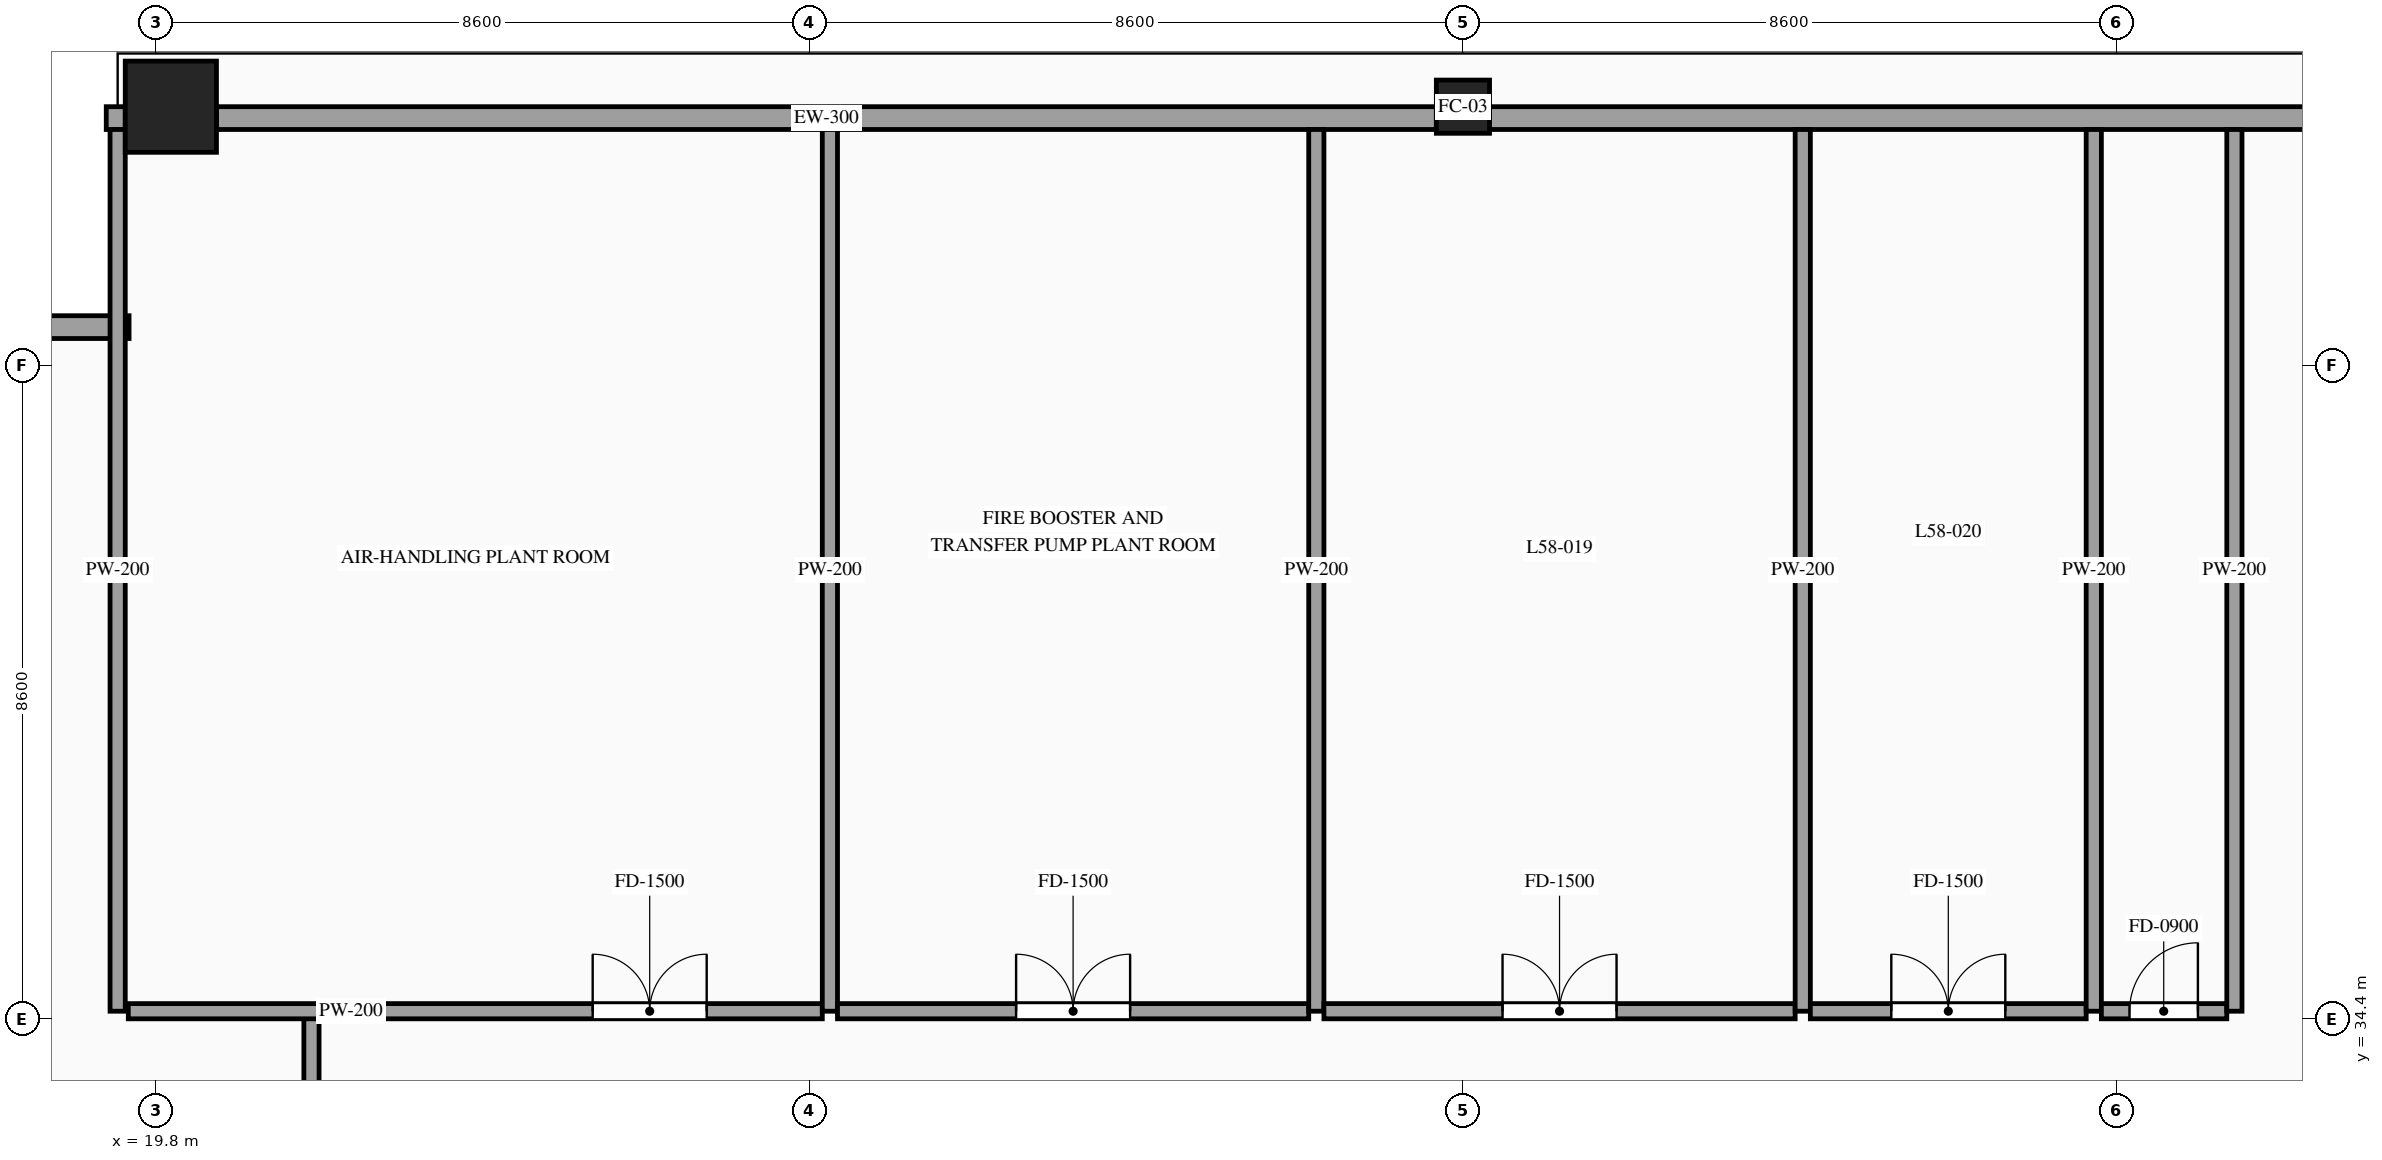
"""IFC4 building model, lengths in metres.
Left out: names, types, materials, properties, quantities, classifications, styles, units other than length and angle.
Written with IfcOpenShell. Run it as: python <this file> out.ifc"""

import sys

from ifc_helpers import new_model, si_unit, direction, frame, frame_2d, origin, origin_2d, place, context, subcontext, project, spatial, rectangle, hollow_rectangle, extrude, source, transform, mapped, element, fill, save


model = new_model("IFC4")
c1 = context("Model", 3, precision=1e-05, world=origin(), true_north=direction((0.0, 1.0)))
c2 = subcontext(c1, "Body", "Model", "MODEL_VIEW")
j1 = project(units=[si_unit("LENGTHUNIT", "METRE"), si_unit("PLANEANGLEUNIT", "RADIAN")], contexts=[c1])
p1 = place(None, origin())
s1 = spatial("IfcSite", under=j1, at=p1, CompositionType="ELEMENT")
p2 = place(p1, origin())
s2 = spatial("IfcBuilding", under=s1, at=p2, CompositionType="ELEMENT")
p3 = place(p2, frame((0.0, 0.0, 219.5)))
s3 = spatial("IfcBuildingStorey", under=s2, at=p3, CompositionType="ELEMENT", Elevation=219.5)
m1 = source(origin(), c2, "Body", "SweptSolid", [
    extrude(hollow_rectangle(XDim=1.2, YDim=1.2, WallThickness=0.055, at=origin_2d()), origin(), (0.0, 0.0, 1.0), 4.6),
])
p4 = place(p3, frame((20.0, 46.4, 0.0), z_axis=(0.0, 0.0, 1.0), x_axis=(1.0, 0.0, 0.0)))
e1 = element("IfcColumn", 1, at=p4, inside=s3, PredefinedType="COLUMN", context=c2, shape_type="MappedRepresentation", body=[
    mapped(m1, transform((0.0, 0.0, 0.0), scale=1.0)),
])
m2 = source(origin(), c2, "Body", "SweptSolid", [
    extrude(hollow_rectangle(XDim=0.7, YDim=0.7, WallThickness=0.032, at=origin_2d()), origin(), (0.0, 0.0, 1.0), 4.6),
])
p5 = place(p3, frame((37.0, 46.4, 0.0), z_axis=(0.0, 0.0, 1.0), x_axis=(1.0, 0.0, 0.0)))
e2 = element("IfcColumn", 2, at=p5, inside=s3, PredefinedType="COLUMN", context=c2, shape_type="MappedRepresentation", body=[
    mapped(m2, transform((0.0, 0.0, 0.0), scale=1.0)),
])
m3 = source(origin(), c2, "Body", "SweptSolid", [
    extrude(rectangle(XDim=2.45, YDim=0.3, at=frame_2d((1.225, 0.0))), origin(), (0.0, 0.0, 1.0), 4.38),
])
p6 = place(p3, frame((19.45, 43.5, 0.0), z_axis=(0.0, 0.0, 1.0), x_axis=(-1.0, 0.0, 0.0)))
e3 = element("IfcWall", 3, at=p6, inside=s3, PredefinedType="SOLIDWALL", context=c2, shape_type="MappedRepresentation", body=[
    mapped(m3, transform((0.0, 0.0, 0.0), scale=1.0)),
])
m4 = source(origin(), c2, "Body", "SweptSolid", [
    extrude(rectangle(XDim=0.25, YDim=0.3, at=frame_2d((0.125, 0.0))), origin(), (0.0, 0.0, 1.0), 4.38),
])
p7 = place(p3, frame((19.15, 46.25, 0.0), z_axis=(0.0, 0.0, 1.0), x_axis=(1.0, 0.0, 0.0)))
e4 = element("IfcWall", 4, at=p7, inside=s3, PredefinedType="SOLIDWALL", context=c2, shape_type="MappedRepresentation", body=[
    mapped(m4, transform((0.0, 0.0, 0.0), scale=1.0)),
])
m5 = source(origin(), c2, "Body", "SweptSolid", [
    extrude(rectangle(XDim=16.05, YDim=0.3, at=frame_2d((8.025, 0.0))), origin(), (0.0, 0.0, 1.0), 3.935),
])
for number, where, z_axis, x_axis in (
    (5, (20.6, 46.25, 0.0), (0.0, 0.0, 1.0), (1.0, 0.0, 0.0)),
    (6, (37.35, 46.25, 0.0), (0.0, 0.0, 1.0), (1.0, 0.0, 0.0)),
):
    element("IfcWall", number, at=place(p3, frame(where, z_axis=z_axis, x_axis=x_axis)), inside=s3, PredefinedType="SOLIDWALL", context=c2, shape_type="MappedRepresentation", body=[
        mapped(m5, transform((0.0, 0.0, 0.0), scale=1.0)),
    ])
m6 = source(origin(), c2, "Body", "SweptSolid", [
    extrude(rectangle(XDim=11.6, YDim=0.2, at=frame_2d((5.8, 0.0))), origin(), (0.0, 0.0, 1.0), 4.38),
])
p8 = place(p3, frame((19.3, 34.5, 0.0), z_axis=(0.0, 0.0, 1.0), x_axis=(0.0, 1.0, 0.0)))
e7 = element("IfcWall", 7, at=p8, inside=s3, PredefinedType="PARTITIONING", context=c2, shape_type="MappedRepresentation", body=[
    mapped(m6, transform((0.0, 0.0, 0.0), scale=1.0)),
])
p9 = place(p3, frame((21.85, 28.1, 0.0), z_axis=(0.0, 0.0, 1.0), x_axis=(0.0, 1.0, 0.0)))
e8 = element("IfcWall", 8, at=p9, inside=s3, PredefinedType="PARTITIONING", context=c2, shape_type="SweptSolid", body=[
    extrude(rectangle(XDim=6.4, YDim=0.2, at=frame_2d((3.2, 0.0))), origin(), (0.0, 0.0, 1.0), 4.38),
])
p10 = place(p9, frame((0.7, 0.0, 0.0)))
e9 = element("IfcOpeningElement", 9, at=p10, cuts=e8, PredefinedType="OPENING", context=c2, shape_type="SweptSolid", body=[
    extrude(rectangle(XDim=1.0, YDim=2.2, at=frame_2d((0.5, 1.1))), frame((0.0, 0.115, 0.0), z_axis=(0.0, -1.0, 0.0), x_axis=(1.0, 0.0, 0.0)), (0.0, 0.0, 1.0), 0.23),
])
p11 = place(p3, frame((19.44, 34.5, 0.0), z_axis=(0.0, 0.0, 1.0), x_axis=(1.0, 0.0, 0.0)))
e10 = element("IfcWall", 10, at=p11, inside=s3, PredefinedType="PARTITIONING", context=c2, shape_type="SweptSolid", body=[
    extrude(rectangle(XDim=9.131, YDim=0.2, at=frame_2d((4.565, 0.0))), origin(), (0.0, 0.0, 1.0), 4.38),
])
p12 = place(p11, frame((6.11, 0.0, 0.0)))
e11 = element("IfcOpeningElement", 11, at=p12, cuts=e10, PredefinedType="OPENING", context=c2, shape_type="SweptSolid", body=[
    extrude(rectangle(XDim=1.5, YDim=2.3, at=frame_2d((0.75, 1.15))), frame((0.0, 0.115, 0.0), z_axis=(0.0, -1.0, 0.0), x_axis=(1.0, 0.0, 0.0)), (0.0, 0.0, 1.0), 0.23),
])
p13 = place(p3, frame((28.671, 34.5, 0.0), z_axis=(0.0, 0.0, 1.0), x_axis=(0.0, 1.0, 0.0)))
e12 = element("IfcWall", 12, at=p13, inside=s3, PredefinedType="PARTITIONING", context=c2, shape_type="MappedRepresentation", body=[
    mapped(m6, transform((0.0, 0.0, 0.0), scale=1.0)),
])
p14 = place(p3, frame((28.771, 34.5, 0.0), z_axis=(0.0, 0.0, 1.0), x_axis=(1.0, 0.0, 0.0)))
e13 = element("IfcWall", 13, at=p14, inside=s3, PredefinedType="PARTITIONING", context=c2, shape_type="SweptSolid", body=[
    extrude(rectangle(XDim=6.2, YDim=0.2, at=frame_2d((3.1, 0.0))), origin(), (0.0, 0.0, 1.0), 4.38),
])
p15 = place(p14, frame((2.35, 0.0, 0.0)))
e14 = element("IfcOpeningElement", 14, at=p15, cuts=e13, PredefinedType="OPENING", context=c2, shape_type="SweptSolid", body=[
    extrude(rectangle(XDim=1.5, YDim=2.3, at=frame_2d((0.75, 1.15))), frame((0.0, 0.115, 0.0), z_axis=(0.0, -1.0, 0.0), x_axis=(1.0, 0.0, 0.0)), (0.0, 0.0, 1.0), 0.23),
])
p16 = place(p3, frame((35.071, 34.5, 0.0), z_axis=(0.0, 0.0, 1.0), x_axis=(0.0, 1.0, 0.0)))
e15 = element("IfcWall", 15, at=p16, inside=s3, PredefinedType="PARTITIONING", context=c2, shape_type="MappedRepresentation", body=[
    mapped(m6, transform((0.0, 0.0, 0.0), scale=1.0)),
])
p17 = place(p3, frame((35.171, 34.5, 0.0), z_axis=(0.0, 0.0, 1.0), x_axis=(1.0, 0.0, 0.0)))
e16 = element("IfcWall", 16, at=p17, inside=s3, PredefinedType="PARTITIONING", context=c2, shape_type="SweptSolid", body=[
    extrude(rectangle(XDim=6.2, YDim=0.2, at=frame_2d((3.1, 0.0))), origin(), (0.0, 0.0, 1.0), 4.38),
])
p18 = place(p17, frame((2.35, 0.0, 0.0)))
e17 = element("IfcOpeningElement", 17, at=p18, cuts=e16, PredefinedType="OPENING", context=c2, shape_type="SweptSolid", body=[
    extrude(rectangle(XDim=1.5, YDim=2.3, at=frame_2d((0.75, 1.15))), frame((0.0, 0.115, 0.0), z_axis=(0.0, -1.0, 0.0), x_axis=(1.0, 0.0, 0.0)), (0.0, 0.0, 1.0), 0.23),
])
p19 = place(p3, frame((41.471, 34.5, 0.0), z_axis=(0.0, 0.0, 1.0), x_axis=(0.0, 1.0, 0.0)))
e18 = element("IfcWall", 18, at=p19, inside=s3, PredefinedType="PARTITIONING", context=c2, shape_type="MappedRepresentation", body=[
    mapped(m6, transform((0.0, 0.0, 0.0), scale=1.0)),
])
p20 = place(p3, frame((41.571, 34.5, 0.0), z_axis=(0.0, 0.0, 1.0), x_axis=(1.0, 0.0, 0.0)))
e19 = element("IfcWall", 19, at=p20, inside=s3, PredefinedType="PARTITIONING", context=c2, shape_type="SweptSolid", body=[
    extrude(rectangle(XDim=3.629, YDim=0.2, at=frame_2d((1.814, 0.0))), origin(), (0.0, 0.0, 1.0), 4.38),
])
p21 = place(p20, frame((1.065, 0.0, 0.0)))
e20 = element("IfcOpeningElement", 20, at=p21, cuts=e19, PredefinedType="OPENING", context=c2, shape_type="SweptSolid", body=[
    extrude(rectangle(XDim=1.5, YDim=2.3, at=frame_2d((0.75, 1.15))), frame((0.0, 0.115, 0.0), z_axis=(0.0, -1.0, 0.0), x_axis=(1.0, 0.0, 0.0)), (0.0, 0.0, 1.0), 0.23),
])
p22 = place(p3, frame((45.3, 34.5, 0.0), z_axis=(0.0, 0.0, 1.0), x_axis=(0.0, 1.0, 0.0)))
e21 = element("IfcWall", 21, at=p22, inside=s3, PredefinedType="PARTITIONING", context=c2, shape_type="MappedRepresentation", body=[
    mapped(m6, transform((0.0, 0.0, 0.0), scale=1.0)),
])
p23 = place(p3, frame((45.4, 34.5, 0.0), z_axis=(0.0, 0.0, 1.0), x_axis=(1.0, 0.0, 0.0)))
e22 = element("IfcWall", 22, at=p23, inside=s3, PredefinedType="PARTITIONING", context=c2, shape_type="SweptSolid", body=[
    extrude(rectangle(XDim=1.65, YDim=0.2, at=frame_2d((0.825, 0.0))), origin(), (0.0, 0.0, 1.0), 4.38),
])
p24 = place(p23, frame((0.37, 0.0, 0.0)))
e23 = element("IfcOpeningElement", 23, at=p24, cuts=e22, PredefinedType="OPENING", context=c2, shape_type="SweptSolid", body=[
    extrude(rectangle(XDim=0.9, YDim=2.15, at=frame_2d((0.45, 1.075))), frame((0.0, 0.115, 0.0), z_axis=(0.0, -1.0, 0.0), x_axis=(1.0, 0.0, 0.0)), (0.0, 0.0, 1.0), 0.23),
])
p25 = place(p3, frame((47.15, 34.5, 0.0), z_axis=(0.0, 0.0, 1.0), x_axis=(0.0, 1.0, 0.0)))
e24 = element("IfcWall", 24, at=p25, inside=s3, PredefinedType="PARTITIONING", context=c2, shape_type="MappedRepresentation", body=[
    mapped(m6, transform((0.0, 0.0, 0.0), scale=1.0)),
])
m7 = source(origin(), c2, "Body", "SweptSolid", [
    extrude(rectangle(XDim=1.5, YDim=2.3, at=frame_2d((0.75, 1.15))), frame((0.0, 0.025, 0.0), z_axis=(0.0, -1.0, 0.0), x_axis=(1.0, 0.0, 0.0)), (0.0, 0.0, 1.0), 0.05),
])
p26 = place(p12, origin())
e25 = element("IfcDoor", 25, at=p26, inside=s3, OperationType="DOUBLE_DOOR_SINGLE_SWING", PredefinedType="DOOR", context=c2, shape_type="MappedRepresentation", body=[
    mapped(m7, transform((0.0, 0.0, 0.0), scale=1.0)),
])
fill(e11, e25)
p27 = place(p15, origin())
e26 = element("IfcDoor", 26, at=p27, inside=s3, OperationType="DOUBLE_DOOR_SINGLE_SWING", PredefinedType="DOOR", context=c2, shape_type="MappedRepresentation", body=[
    mapped(m7, transform((0.0, 0.0, 0.0), scale=1.0)),
])
fill(e14, e26)
p28 = place(p18, origin())
e27 = element("IfcDoor", 27, at=p28, inside=s3, OperationType="DOUBLE_DOOR_SINGLE_SWING", PredefinedType="DOOR", context=c2, shape_type="MappedRepresentation", body=[
    mapped(m7, transform((0.0, 0.0, 0.0), scale=1.0)),
])
fill(e17, e27)
p29 = place(p21, origin())
e28 = element("IfcDoor", 28, at=p29, inside=s3, OperationType="DOUBLE_DOOR_SINGLE_SWING", PredefinedType="DOOR", context=c2, shape_type="MappedRepresentation", body=[
    mapped(m7, transform((0.0, 0.0, 0.0), scale=1.0)),
])
fill(e20, e28)
m8 = source(origin(), c2, "Body", "SweptSolid", [
    extrude(rectangle(XDim=0.9, YDim=2.15, at=frame_2d((0.45, 1.075))), frame((0.0, 0.025, 0.0), z_axis=(0.0, -1.0, 0.0), x_axis=(1.0, 0.0, 0.0)), (0.0, 0.0, 1.0), 0.05),
])
p30 = place(p24, origin())
e29 = element("IfcDoor", 29, at=p30, inside=s3, OperationType="SINGLE_SWING_RIGHT", PredefinedType="DOOR", context=c2, shape_type="MappedRepresentation", body=[
    mapped(m8, transform((0.0, 0.0, 0.0), scale=1.0)),
])
fill(e23, e29)
save(model, sys.argv[1])
